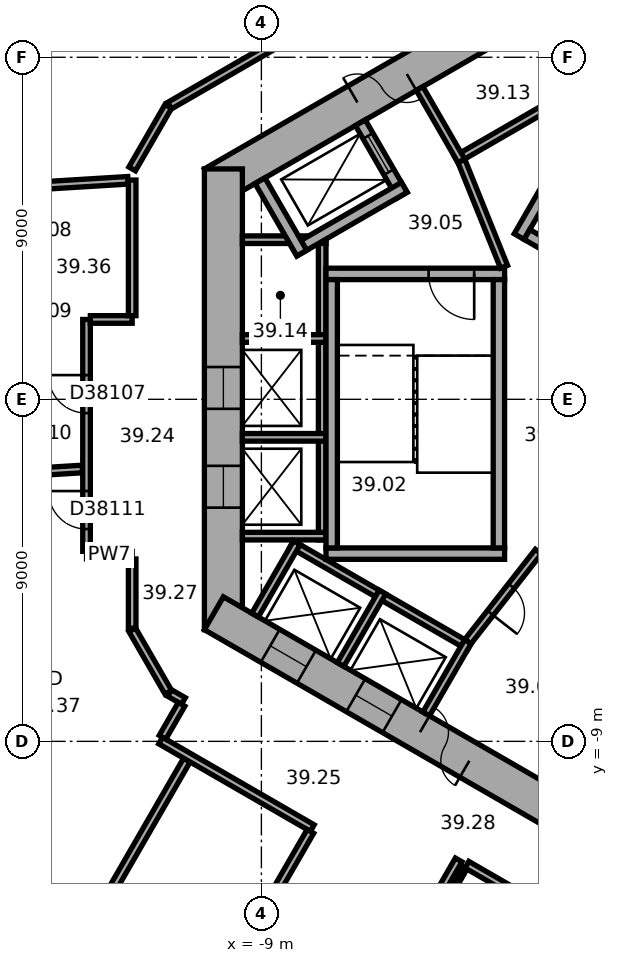
"""IFC4 building model, lengths in metres.
Left out: names, types, materials, properties, quantities, classifications, styles, units other than length and angle.
Written with IfcOpenShell. Run it as: python <this file> out.ifc"""

import sys

from ifc_helpers import new_model, si_unit, direction, frame, frame_2d, origin, place, context, subcontext, project, spatial, rectangle, extrude, element, fill, save


model = new_model("IFC4")
c1 = context("Model", 3, precision=1e-05, world=origin(), true_north=direction((0.0, 1.0)))
c2 = subcontext(c1, "Body", "Model", "MODEL_VIEW")
j1 = project(units=[si_unit("LENGTHUNIT", "METRE"), si_unit("PLANEANGLEUNIT", "RADIAN")], contexts=[c1])
p1 = place(None, origin())
s1 = spatial("IfcSite", under=j1, at=p1, CompositionType="ELEMENT")
p2 = place(p1, origin())
s2 = spatial("IfcBuilding", under=s1, at=p2, CompositionType="ELEMENT")
p3 = place(p2, frame((0.0, 0.0, 161.4)))
s3 = spatial("IfcBuildingStorey", under=s2, at=p3, CompositionType="ELEMENT", Elevation=161.4)
p4 = place(p3, frame((0.25, 11.691, 0.0), z_axis=(0.0, 0.0, 1.0), x_axis=(-0.866022616891, -0.50000482701, 0.0)))
e1 = element("IfcWall", 1, at=p4, inside=s3, PredefinedType="SHEAR", context=c2, shape_type="SweptSolid", body=[
    extrude(rectangle(XDim=12.125, YDim=1.0, at=frame_2d((6.062, 0.0))), origin(), (0.0, 0.0, 1.0), 3.7),
])
p5 = place(p4, frame((6.262, 0.0, 0.0)))
e2 = element("IfcOpeningElement", 2, at=p5, cuts=e1, PredefinedType="OPENING", context=c2, shape_type="SweptSolid", body=[
    extrude(rectangle(XDim=1.5, YDim=2.1, at=frame_2d((0.75, 1.05))), frame((0.0, 0.51, 0.0), z_axis=(0.0, -1.0, 0.0), x_axis=(1.0, 0.0, 0.0)), (0.0, 0.0, 1.0), 1.02),
])
p6 = place(p4, frame((3.112, 0.0, 0.0)))
e3 = element("IfcOpeningElement", 3, at=p6, cuts=e1, PredefinedType="OPENING", context=c2, shape_type="SweptSolid", body=[
    extrude(rectangle(XDim=0.9, YDim=2.1, at=frame_2d((0.45, 1.05))), frame((0.0, 0.51, 0.0), z_axis=(0.0, -1.0, 0.0), x_axis=(1.0, 0.0, 0.0)), (0.0, 0.0, 1.0), 1.02),
])
p7 = place(p3, frame((-10.0, 6.062, 0.0), z_axis=(0.0, 0.0, 1.0), x_axis=(0.0, -1.0, 0.0)))
e4 = element("IfcWall", 4, at=p7, inside=s3, PredefinedType="SHEAR", context=c2, shape_type="SweptSolid", body=[
    extrude(rectangle(XDim=12.125, YDim=1.0, at=frame_2d((6.062, 0.0))), origin(), (0.0, 0.0, 1.0), 3.7),
])
p8 = place(p7, frame((5.212, 0.0, 0.0)))
e5 = element("IfcOpeningElement", 5, at=p8, cuts=e4, PredefinedType="OPENING", context=c2, shape_type="SweptSolid", body=[
    extrude(rectangle(XDim=1.1, YDim=2.1, at=frame_2d((0.55, 1.05))), frame((0.0, 0.51, 0.0), z_axis=(0.0, -1.0, 0.0), x_axis=(1.0, 0.0, 0.0)), (0.0, 0.0, 1.0), 1.02),
])
p9 = place(p7, frame((7.812, 0.0, 0.0)))
e6 = element("IfcOpeningElement", 6, at=p9, cuts=e4, PredefinedType="OPENING", context=c2, shape_type="SweptSolid", body=[
    extrude(rectangle(XDim=1.1, YDim=2.1, at=frame_2d((0.55, 1.05))), frame((0.0, 0.51, 0.0), z_axis=(0.0, -1.0, 0.0), x_axis=(1.0, 0.0, 0.0)), (0.0, 0.0, 1.0), 1.02),
])
p10 = place(p3, frame((-10.25, -5.629, 0.0), z_axis=(0.0, 0.0, 1.0), x_axis=(0.866022616891, -0.50000482701, 0.0)))
e7 = element("IfcWall", 7, at=p10, inside=s3, PredefinedType="SHEAR", context=c2, shape_type="SweptSolid", body=[
    extrude(rectangle(XDim=12.125, YDim=1.0, at=frame_2d((6.062, 0.0))), origin(), (0.0, 0.0, 1.0), 3.7),
])
p11 = place(p10, frame((6.262, 0.0, 0.0)))
e8 = element("IfcOpeningElement", 8, at=p11, cuts=e7, PredefinedType="OPENING", context=c2, shape_type="SweptSolid", body=[
    extrude(rectangle(XDim=1.5, YDim=2.1, at=frame_2d((0.75, 1.05))), frame((0.0, 0.51, 0.0), z_axis=(0.0, -1.0, 0.0), x_axis=(1.0, 0.0, 0.0)), (0.0, 0.0, 1.0), 1.02),
])
p12 = place(p10, frame((1.712, 0.0, 0.0)))
e9 = element("IfcOpeningElement", 9, at=p12, cuts=e7, PredefinedType="OPENING", context=c2, shape_type="SweptSolid", body=[
    extrude(rectangle(XDim=1.1, YDim=2.1, at=frame_2d((0.55, 1.05))), frame((0.0, 0.51, 0.0), z_axis=(0.0, -1.0, 0.0), x_axis=(1.0, 0.0, 0.0)), (0.0, 0.0, 1.0), 1.02),
])
p13 = place(p10, frame((4.312, 0.0, 0.0)))
e10 = element("IfcOpeningElement", 10, at=p13, cuts=e7, PredefinedType="OPENING", context=c2, shape_type="SweptSolid", body=[
    extrude(rectangle(XDim=1.1, YDim=2.1, at=frame_2d((0.55, 1.05))), frame((0.0, 0.51, 0.0), z_axis=(0.0, -1.0, 0.0), x_axis=(1.0, 0.0, 0.0)), (0.0, 0.0, 1.0), 1.02),
])
p14 = place(p3, frame((0.803, 9.009, 0.0), z_axis=(0.0, 0.0, 1.0), x_axis=(-0.866028230842, -0.499995103361, 0.0)))
e11 = element("IfcWall", 11, at=p14, inside=s3, PredefinedType="PARTITIONING", context=c2, shape_type="SweptSolid", body=[
    extrude(rectangle(XDim=5.4, YDim=0.2, at=frame_2d((2.7, 0.0))), origin(), (0.0, 0.0, 1.0), 3.42),
])
p15 = place(p3, frame((-3.737, 6.272, 0.0), z_axis=(0.0, 0.0, 1.0), x_axis=(-0.50002983664, 0.866008176907, 0.0)))
e12 = element("IfcWall", 12, at=p15, inside=s3, PredefinedType="PARTITIONING", context=c2, shape_type="SweptSolid", body=[
    extrude(rectangle(XDim=2.2, YDim=0.2, at=frame_2d((1.1, 0.0))), origin(), (0.0, 0.0, 1.0), 3.42),
])
p16 = place(p3, frame((-7.4, 4.3, 0.0), z_axis=(0.0, 0.0, 1.0), x_axis=(0.0, -1.0, 0.0)))
e13 = element("IfcWall", 13, at=p16, inside=s3, PredefinedType="PARTITIONING", context=c2, shape_type="SweptSolid", body=[
    extrude(rectangle(XDim=8.0, YDim=0.2, at=frame_2d((4.0, 0.0))), origin(), (0.0, 0.0, 1.0), 3.42),
])
for number, where, z_axis, x_axis in (
    (14, (-7.3, 4.2, 0.0), (0.0, 0.0, 1.0), (-1.0, 0.0, 0.0)),
    (15, (-7.3, 1.6, 0.0), (0.0, 0.0, 1.0), (-1.0, 0.0, 0.0)),
    (16, (-7.3, -1.0, 0.0), (0.0, 0.0, 1.0), (-1.0, 0.0, 0.0)),
    (17, (-7.3, -3.6, 0.0), (0.0, 0.0, 1.0), (-1.0, 0.0, 0.0)),
):
    element("IfcWall", number, at=place(p3, frame(where, z_axis=z_axis, x_axis=x_axis)), inside=s3, PredefinedType="PARTITIONING", context=c2, shape_type="SweptSolid", body=[
        extrude(rectangle(XDim=2.2, YDim=0.2, at=frame_2d((1.1, 0.0))), origin(), (0.0, 0.0, 1.0), 3.42),
    ])
p17 = place(p3, frame((-8.203, -3.809, 0.0), z_axis=(0.0, 0.0, 1.0), x_axis=(0.866028230842, -0.499995103361, 0.0)))
e18 = element("IfcWall", 18, at=p17, inside=s3, PredefinedType="PARTITIONING", context=c2, shape_type="SweptSolid", body=[
    extrude(rectangle(XDim=5.4, YDim=0.2, at=frame_2d((2.7, 0.0))), origin(), (0.0, 0.0, 1.0), 3.42),
])
for number, where, z_axis, x_axis in (
    (19, (-8.067, -3.772, 0.0), (0.0, 0.0, 1.0), (-0.5, -0.866, 0.0)),
    (20, (-5.815, -5.072, 0.0), (0.0, 0.0, 1.0), (-0.5, -0.866, 0.0)),
):
    element("IfcWall", number, at=place(p3, frame(where, z_axis=z_axis, x_axis=x_axis)), inside=s3, PredefinedType="PARTITIONING", context=c2, shape_type="SweptSolid", body=[
        extrude(rectangle(XDim=2.2, YDim=0.2, at=frame_2d((1.1, 0.0))), origin(), (0.0, 0.0, 1.0), 3.42),
    ])
p18 = place(p3, frame((-3.563, -6.372, 0.0), z_axis=(0.0, 0.0, 1.0), x_axis=(-0.499994660107, -0.866028486751, 0.0)))
e21 = element("IfcWall", 21, at=p18, inside=s3, PredefinedType="PARTITIONING", context=c2, shape_type="SweptSolid", body=[
    extrude(rectangle(XDim=2.2, YDim=0.2, at=frame_2d((1.1, 0.0))), origin(), (0.0, 0.0, 1.0), 3.42),
])
p19 = place(p3, frame((-2.216, 4.282, 0.0), z_axis=(0.0, 0.0, 1.0), x_axis=(0.499977259774, 0.866038532462, 0.0)))
e22 = element("IfcWall", 22, at=p19, inside=s3, PredefinedType="SHEAR", context=c2, shape_type="SweptSolid", body=[
    extrude(rectangle(XDim=4.7, YDim=0.3, at=frame_2d((2.35, 0.0))), origin(), (0.0, 0.0, 1.0), 3.42),
])
p20 = place(p3, frame((4.103, 0.807, 0.0), z_axis=(0.0, 0.0, 1.0), x_axis=(-0.866027801685, 0.499995846692, 0.0)))
e23 = element("IfcWall", 23, at=p20, inside=s3, PredefinedType="SHEAR", context=c2, shape_type="SweptSolid", body=[
    extrude(rectangle(XDim=7.06, YDim=0.3, at=frame_2d((3.53, 0.0))), origin(), (0.0, 0.0, 1.0), 3.42),
])
p21 = place(p3, frame((-2.6, 3.3, 0.0), z_axis=(0.0, 0.0, 1.0), x_axis=(-1.0, 0.0, 0.0)))
e24 = element("IfcWall", 24, at=p21, inside=s3, PredefinedType="SHEAR", context=c2, shape_type="SweptSolid", body=[
    extrude(rectangle(XDim=4.7, YDim=0.3, at=frame_2d((2.35, 0.0))), origin(), (0.0, 0.0, 1.0), 3.42),
])
p22 = place(p21, frame((0.8, 0.0, 0.0)))
e25 = element("IfcOpeningElement", 25, at=p22, cuts=e24, PredefinedType="OPENING", context=c2, shape_type="SweptSolid", body=[
    extrude(rectangle(XDim=1.2, YDim=2.1, at=frame_2d((0.6, 1.05))), frame((0.0, 0.16, 0.0), z_axis=(0.0, -1.0, 0.0), x_axis=(1.0, 0.0, 0.0)), (0.0, 0.0, 1.0), 0.32),
])
p23 = place(p3, frame((-2.6, -4.06, 0.0), z_axis=(0.0, 0.0, 1.0), x_axis=(-1.0, 0.0, 0.0)))
e26 = element("IfcWall", 26, at=p23, inside=s3, PredefinedType="SHEAR", context=c2, shape_type="SweptSolid", body=[
    extrude(rectangle(XDim=4.7, YDim=0.3, at=frame_2d((2.35, 0.0))), origin(), (0.0, 0.0, 1.0), 3.42),
])
for number, where, z_axis, x_axis in (
    (27, (-2.75, 3.15, 0.0), (0.0, 0.0, 1.0), (0.0, -1.0, 0.0)),
    (28, (-7.15, 3.15, 0.0), (0.0, 0.0, 1.0), (0.0, -1.0, 0.0)),
):
    element("IfcWall", number, at=place(p3, frame(where, z_axis=z_axis, x_axis=x_axis)), inside=s3, PredefinedType="SHEAR", context=c2, shape_type="SweptSolid", body=[
        extrude(rectangle(XDim=7.06, YDim=0.3, at=frame_2d((3.53, 0.0))), origin(), (0.0, 0.0, 1.0), 3.42),
    ])
p24 = place(p3, frame((-5.295, 5.372, 0.0), z_axis=(0.0, 0.0, 1.0), x_axis=(-0.500077893725, 0.86598042715, 0.0)))
e29 = element("IfcWall", 29, at=p24, inside=s3, PredefinedType="SHEAR", context=c2, shape_type="SweptSolid", body=[
    extrude(rectangle(XDim=2.2, YDim=0.3, at=frame_2d((1.1, 0.0))), origin(), (0.0, 0.0, 1.0), 3.42),
])
p25 = place(p24, frame((0.7, 0.0, 0.0)))
e30 = element("IfcOpeningElement", 30, at=p25, cuts=e29, PredefinedType="OPENING", context=c2, shape_type="SweptSolid", body=[
    extrude(rectangle(XDim=1.1, YDim=2.1, at=frame_2d((0.55, 1.05))), frame((0.0, 0.16, 0.0), z_axis=(0.0, -1.0, 0.0), x_axis=(1.0, 0.0, 0.0)), (0.0, 0.0, 1.0), 0.32),
])
p26 = place(p3, frame((-5.24, 5.577, 0.0), z_axis=(0.0, 0.0, 1.0), x_axis=(-0.866014461049, -0.500018952895, 0.0)))
e31 = element("IfcWall", 31, at=p26, inside=s3, PredefinedType="SHEAR", context=c2, shape_type="SweptSolid", body=[
    extrude(rectangle(XDim=3.35, YDim=0.3, at=frame_2d((1.675, 0.0))), origin(), (0.0, 0.0, 1.0), 3.42),
])
p27 = place(p3, frame((-7.937, 3.847, 0.0), z_axis=(0.0, 0.0, 1.0), x_axis=(-0.50002983664, 0.866008176907, 0.0)))
e32 = element("IfcWall", 32, at=p27, inside=s3, PredefinedType="SHEAR", context=c2, shape_type="SweptSolid", body=[
    extrude(rectangle(XDim=2.2, YDim=0.3, at=frame_2d((1.1, 0.0))), origin(), (0.0, 0.0, 1.0), 3.42),
])
p28 = place(p3, frame((-2.615, 3.487, 0.0), z_axis=(0.0, 0.0, 1.0), x_axis=(-0.373576831041, 0.92759924068, 0.0)))
e33 = element("IfcWall", 33, at=p28, inside=s3, PredefinedType="PARTITIONING", context=c2, shape_type="SweptSolid", body=[
    extrude(rectangle(XDim=3.002, YDim=0.2, at=frame_2d((1.501, 0.0))), origin(), (0.0, 0.0, 1.0), 3.42),
])
p29 = place(p3, frame((-1.712, -4.008, 0.0), z_axis=(0.0, 0.0, 1.0), x_axis=(-0.616549420702, -0.787316208287, 0.0)))
e34 = element("IfcWall", 34, at=p29, inside=s3, PredefinedType="PARTITIONING", context=c2, shape_type="SweptSolid", body=[
    extrude(rectangle(XDim=3.002, YDim=0.2, at=frame_2d((1.501, 0.0))), origin(), (0.0, 0.0, 1.0), 3.42),
])
p30 = place(p29, frame((1.15, 0.0, 0.0)))
e35 = element("IfcOpeningElement", 35, at=p30, cuts=e34, PredefinedType="OPENING", context=c2, shape_type="SweptSolid", body=[
    extrude(rectangle(XDim=0.9, YDim=2.1, at=frame_2d((0.45, 1.05))), frame((0.0, 0.11, 0.0), z_axis=(0.0, -1.0, 0.0), x_axis=(1.0, 0.0, 0.0)), (0.0, 0.0, 1.0), 0.22),
])
p31 = place(p3, frame((-21.109, 5.237, 0.0), z_axis=(0.0, 0.0, 1.0), x_axis=(0.998135264293, 0.061040922131, 0.0)))
e36 = element("IfcWall", 36, at=p31, inside=s3, PredefinedType="PARTITIONING", context=c2, shape_type="SweptSolid", body=[
    extrude(rectangle(XDim=8.615, YDim=0.2, at=frame_2d((4.308, 0.0))), origin(), (0.0, 0.0, 1.0), 3.42),
])
p32 = place(p3, frame((-20.651, -2.258, 0.0), z_axis=(0.0, 0.0, 1.0), x_axis=(0.998133960965, 0.061062230286, 0.0)))
e37 = element("IfcWall", 37, at=p32, inside=s3, PredefinedType="PARTITIONING", context=c2, shape_type="SweptSolid", body=[
    extrude(rectangle(XDim=6.953, YDim=0.2, at=frame_2d((3.477, 0.0))), origin(), (0.0, 0.0, 1.0), 3.42),
])
p33 = place(p3, frame((-14.486, -15.597, 0.0), z_axis=(0.0, 0.0, 1.0), x_axis=(0.499983284935, 0.866035054017, 0.0)))
e38 = element("IfcWall", 38, at=p33, inside=s3, PredefinedType="PARTITIONING", context=c2, shape_type="SweptSolid", body=[
    extrude(rectangle(XDim=7.049, YDim=0.2, at=frame_2d((3.524, 0.0))), origin(), (0.0, 0.0, 1.0), 3.42),
])
p34 = place(p3, frame((-13.601, -4.101, 0.0), z_axis=(0.0, 0.0, 1.0), x_axis=(1.0, 0.0, 0.0)))
e39 = element("IfcWall", 39, at=p34, inside=s3, PredefinedType="PARTITIONING", context=c2, shape_type="SweptSolid", body=[
    extrude(rectangle(XDim=1.201, YDim=0.2, at=frame_2d((0.601, 0.0))), origin(), (0.0, 0.0, 1.0), 3.42),
])
p35 = place(p3, frame((-13.601, 2.101, 0.0), z_axis=(0.0, 0.0, 1.0), x_axis=(0.0, -1.0, 0.0)))
e40 = element("IfcWall", 40, at=p35, inside=s3, PredefinedType="PARTITIONING", context=c2, shape_type="SweptSolid", body=[
    extrude(rectangle(XDim=6.102, YDim=0.2, at=frame_2d((3.051, 0.0))), origin(), (0.0, 0.0, 1.0), 3.42),
])
p36 = place(p35, frame((1.464, 0.0, 0.0)))
e41 = element("IfcOpeningElement", 41, at=p36, cuts=e40, PredefinedType="OPENING", context=c2, shape_type="SweptSolid", body=[
    extrude(rectangle(XDim=1.0, YDim=2.1, at=frame_2d((0.5, 1.05))), frame((0.0, 0.11, 0.0), z_axis=(0.0, -1.0, 0.0), x_axis=(1.0, 0.0, 0.0)), (0.0, 0.0, 1.0), 0.22),
])
p37 = place(p35, frame((4.515, 0.0, 0.0)))
e42 = element("IfcOpeningElement", 42, at=p37, cuts=e40, PredefinedType="OPENING", context=c2, shape_type="SweptSolid", body=[
    extrude(rectangle(XDim=1.0, YDim=2.1, at=frame_2d((0.5, 1.05))), frame((0.0, 0.11, 0.0), z_axis=(0.0, -1.0, 0.0), x_axis=(1.0, 0.0, 0.0)), (0.0, 0.0, 1.0), 0.22),
])
p38 = place(p3, frame((-12.4, -6.062, 0.0), z_axis=(0.0, 0.0, 1.0), x_axis=(0.500022797313, -0.86601224135, 0.0)))
e43 = element("IfcWall", 43, at=p38, inside=s3, PredefinedType="PARTITIONING", context=c2, shape_type="SweptSolid", body=[
    extrude(rectangle(XDim=1.9, YDim=0.2, at=frame_2d((0.95, 0.0))), origin(), (0.0, 0.0, 1.0), 3.42),
])
p39 = place(p3, frame((-12.4, -4.201, 0.0), z_axis=(0.0, 0.0, 1.0), x_axis=(0.0, -1.0, 0.0)))
e44 = element("IfcWall", 44, at=p39, inside=s3, PredefinedType="PARTITIONING", context=c2, shape_type="SweptSolid", body=[
    extrude(rectangle(XDim=1.821, YDim=0.2, at=frame_2d((0.911, 0.0))), origin(), (0.0, 0.0, 1.0), 3.42),
])
p40 = place(p3, frame((-12.4, 2.101, 0.0), z_axis=(0.0, 0.0, 1.0), x_axis=(-1.0, 0.0, 0.0)))
e45 = element("IfcWall", 45, at=p40, inside=s3, PredefinedType="PARTITIONING", context=c2, shape_type="SweptSolid", body=[
    extrude(rectangle(XDim=1.101, YDim=0.2, at=frame_2d((0.551, 0.0))), origin(), (0.0, 0.0, 1.0), 3.42),
])
p41 = place(p3, frame((-12.4, 5.769, 0.0), z_axis=(0.0, 0.0, 1.0), x_axis=(0.0, -1.0, 0.0)))
e46 = element("IfcWall", 46, at=p41, inside=s3, PredefinedType="PARTITIONING", context=c2, shape_type="SweptSolid", body=[
    extrude(rectangle(XDim=3.568, YDim=0.2, at=frame_2d((1.784, 0.0))), origin(), (0.0, 0.0, 1.0), 3.42),
])
p42 = place(p3, frame((-11.651, -8.978, 0.0), z_axis=(0.0, 0.0, 1.0), x_axis=(0.866010893236, -0.500025132165, 0.0)))
e47 = element("IfcWall", 47, at=p42, inside=s3, PredefinedType="PARTITIONING", context=c2, shape_type="SweptSolid", body=[
    extrude(rectangle(XDim=4.608, YDim=0.2, at=frame_2d((2.304, 0.0))), origin(), (0.0, 0.0, 1.0), 3.42),
])
p43 = place(p3, frame((-11.45, 7.708, 0.0), z_axis=(0.0, 0.0, 1.0), x_axis=(-0.500022797313, -0.86601224135, 0.0)))
e48 = element("IfcWall", 48, at=p43, inside=s3, PredefinedType="PARTITIONING", context=c2, shape_type="SweptSolid", body=[
    extrude(rectangle(XDim=1.9, YDim=0.2, at=frame_2d((0.95, 0.0))), origin(), (0.0, 0.0, 1.0), 3.42),
])
p44 = place(p3, frame((-11.415, -7.728, 0.0), z_axis=(0.0, 0.0, 1.0), x_axis=(0.865915281873, -0.500190688257, 0.0)))
e49 = element("IfcWall", 49, at=p44, inside=s3, PredefinedType="PARTITIONING", context=c2, shape_type="SweptSolid", body=[
    extrude(rectangle(XDim=0.421, YDim=0.2, at=frame_2d((0.21, 0.0))), origin(), (0.0, 0.0, 1.0), 3.42),
])
p45 = place(p3, frame((-11.235, -17.474, 0.0), z_axis=(0.0, 0.0, 1.0), x_axis=(0.500009260695, 0.866020057054, 0.0)))
e50 = element("IfcWall", 50, at=p45, inside=s3, PredefinedType="PARTITIONING", context=c2, shape_type="SweptSolid", body=[
    extrude(rectangle(XDim=7.049, YDim=0.2, at=frame_2d((3.524, 0.0))), origin(), (0.0, 0.0, 1.0), 2.87),
])
p46 = place(p45, frame((3.024, 0.0, 0.0)))
e51 = element("IfcOpeningElement", 51, at=p46, cuts=e50, PredefinedType="OPENING", context=c2, shape_type="SweptSolid", body=[
    extrude(rectangle(XDim=1.0, YDim=2.1, at=frame_2d((0.5, 1.05))), frame((0.0, 0.11, 0.0), z_axis=(0.0, -1.0, 0.0), x_axis=(1.0, 0.0, 0.0)), (0.0, 0.0, 1.0), 0.22),
])
p47 = place(p3, frame((-11.101, -8.025, 0.0), z_axis=(0.0, 0.0, 1.0), x_axis=(-0.500074377092, -0.865982457891, 0.0)))
e52 = element("IfcWall", 52, at=p47, inside=s3, PredefinedType="PARTITIONING", context=c2, shape_type="SweptSolid", body=[
    extrude(rectangle(XDim=1.001, YDim=0.2, at=frame_2d((0.5, 0.0))), origin(), (0.0, 0.0, 1.0), 3.42),
])
p48 = place(p3, frame((-8.678, 9.308, 0.0), z_axis=(0.0, 0.0, 1.0), x_axis=(-0.866000359435, -0.500043375578, 0.0)))
e53 = element("IfcWall", 53, at=p48, inside=s3, PredefinedType="PARTITIONING", context=c2, shape_type="SweptSolid", body=[
    extrude(rectangle(XDim=3.161, YDim=0.2, at=frame_2d((1.581, 0.0))), origin(), (0.0, 0.0, 1.0), 3.42),
])
p49 = place(p3, frame((-7.984, -19.351, 0.0), z_axis=(0.0, 0.0, 1.0), x_axis=(0.500010139422, 0.866019549707, 0.0)))
e54 = element("IfcWall", 54, at=p49, inside=s3, PredefinedType="PARTITIONING", context=c2, shape_type="SweptSolid", body=[
    extrude(rectangle(XDim=8.35, YDim=0.2, at=frame_2d((4.175, 0.0))), origin(), (0.0, 0.0, 1.0), 3.42),
])
p50 = place(p49, frame((3.675, 0.0, 0.0)))
e55 = element("IfcOpeningElement", 55, at=p50, cuts=e54, PredefinedType="OPENING", context=c2, shape_type="SweptSolid", body=[
    extrude(rectangle(XDim=1.0, YDim=2.1, at=frame_2d((0.5, 1.05))), frame((0.0, 0.11, 0.0), z_axis=(0.0, -1.0, 0.0), x_axis=(1.0, 0.0, 0.0)), (0.0, 0.0, 1.0), 0.22),
])
p51 = place(p3, frame((-5.192, -15.016, 0.0), z_axis=(0.0, 0.0, 1.0), x_axis=(0.500026960575, 0.86600983753, 0.0)))
e56 = element("IfcWall", 56, at=p51, inside=s3, PredefinedType="PARTITIONING", context=c2, shape_type="SweptSolid", body=[
    extrude(rectangle(XDim=3.1, YDim=0.12, at=frame_2d((1.55, 0.0))), origin(), (0.0, 0.0, 1.0), 3.42),
])
p52 = place(p3, frame((-3.592, -12.244, 0.0), z_axis=(0.0, 0.0, 1.0), x_axis=(0.866034573852, -0.49998411664, 0.0)))
e57 = element("IfcWall", 57, at=p52, inside=s3, PredefinedType="PARTITIONING", context=c2, shape_type="SweptSolid", body=[
    extrude(rectangle(XDim=2.8, YDim=0.2, at=frame_2d((1.4, 0.0))), origin(), (0.0, 0.0, 1.0), 3.42),
])
p53 = place(p5, origin())
e58 = element("IfcDoor", 58, at=p53, inside=s3, OperationType="DOUBLE_DOOR_SINGLE_SWING", PredefinedType="DOOR", context=c2, shape_type="SweptSolid", body=[
    extrude(rectangle(XDim=1.5, YDim=2.1, at=frame_2d((0.75, 1.05))), frame((0.0, 0.025, 0.0), z_axis=(0.0, -1.0, 0.0), x_axis=(1.0, 0.0, 0.0)), (0.0, 0.0, 1.0), 0.05),
])
fill(e2, e58)
p54 = place(p11, origin())
e59 = element("IfcDoor", 59, at=p54, inside=s3, OperationType="DOUBLE_DOOR_SINGLE_SWING", PredefinedType="DOOR", context=c2, shape_type="SweptSolid", body=[
    extrude(rectangle(XDim=1.5, YDim=2.1, at=frame_2d((0.75, 1.05))), frame((0.0, 0.025, 0.0), z_axis=(0.0, -1.0, 0.0), x_axis=(1.0, 0.0, 0.0)), (0.0, 0.0, 1.0), 0.05),
])
fill(e8, e59)
p55 = place(p22, origin())
e60 = element("IfcDoor", 60, at=p55, inside=s3, OperationType="SINGLE_SWING_RIGHT", PredefinedType="DOOR", context=c2, shape_type="SweptSolid", body=[
    extrude(rectangle(XDim=1.2, YDim=2.1, at=frame_2d((0.6, 1.05))), frame((0.0, 0.025, 0.0), z_axis=(0.0, -1.0, 0.0), x_axis=(1.0, 0.0, 0.0)), (0.0, 0.0, 1.0), 0.05),
])
fill(e25, e60)
p56 = place(p30, origin())
e61 = element("IfcDoor", 61, at=p56, inside=s3, OperationType="SINGLE_SWING_LEFT", PredefinedType="DOOR", context=c2, shape_type="SweptSolid", body=[
    extrude(rectangle(XDim=0.9, YDim=2.1, at=frame_2d((0.45, 1.05))), frame((0.0, 0.025, 0.0), z_axis=(0.0, -1.0, 0.0), x_axis=(1.0, 0.0, 0.0)), (0.0, 0.0, 1.0), 0.05),
])
fill(e35, e61)
p57 = place(p25, origin())
e62 = element("IfcDoor", 62, at=p57, inside=s3, OperationType="DOUBLE_DOOR_SLIDING", PredefinedType="DOOR", context=c2, shape_type="SweptSolid", body=[
    extrude(rectangle(XDim=1.1, YDim=2.1, at=frame_2d((0.55, 1.05))), frame((0.0, 0.025, 0.0), z_axis=(0.0, -1.0, 0.0), x_axis=(1.0, 0.0, 0.0)), (0.0, 0.0, 1.0), 0.05),
])
fill(e30, e62)
p58 = place(p8, origin())
e63 = element("IfcDoor", 63, at=p58, inside=s3, OperationType="DOUBLE_DOOR_SLIDING", PredefinedType="DOOR", context=c2, shape_type="SweptSolid", body=[
    extrude(rectangle(XDim=1.1, YDim=2.1, at=frame_2d((0.55, 1.05))), frame((0.0, 0.025, 0.0), z_axis=(0.0, -1.0, 0.0), x_axis=(1.0, 0.0, 0.0)), (0.0, 0.0, 1.0), 0.05),
])
fill(e5, e63)
p59 = place(p9, origin())
e64 = element("IfcDoor", 64, at=p59, inside=s3, OperationType="DOUBLE_DOOR_SLIDING", PredefinedType="DOOR", context=c2, shape_type="SweptSolid", body=[
    extrude(rectangle(XDim=1.1, YDim=2.1, at=frame_2d((0.55, 1.05))), frame((0.0, 0.025, 0.0), z_axis=(0.0, -1.0, 0.0), x_axis=(1.0, 0.0, 0.0)), (0.0, 0.0, 1.0), 0.05),
])
fill(e6, e64)
p60 = place(p12, origin())
e65 = element("IfcDoor", 65, at=p60, inside=s3, OperationType="DOUBLE_DOOR_SLIDING", PredefinedType="DOOR", context=c2, shape_type="SweptSolid", body=[
    extrude(rectangle(XDim=1.1, YDim=2.1, at=frame_2d((0.55, 1.05))), frame((0.0, 0.025, 0.0), z_axis=(0.0, -1.0, 0.0), x_axis=(1.0, 0.0, 0.0)), (0.0, 0.0, 1.0), 0.05),
])
fill(e9, e65)
p61 = place(p13, origin())
e66 = element("IfcDoor", 66, at=p61, inside=s3, OperationType="DOUBLE_DOOR_SLIDING", PredefinedType="DOOR", context=c2, shape_type="SweptSolid", body=[
    extrude(rectangle(XDim=1.1, YDim=2.1, at=frame_2d((0.55, 1.05))), frame((0.0, 0.025, 0.0), z_axis=(0.0, -1.0, 0.0), x_axis=(1.0, 0.0, 0.0)), (0.0, 0.0, 1.0), 0.05),
])
fill(e10, e66)
p62 = place(p36, origin())
e67 = element("IfcDoor", 67, at=p62, inside=s3, OperationType="SINGLE_SWING_LEFT", PredefinedType="DOOR", context=c2, shape_type="SweptSolid", body=[
    extrude(rectangle(XDim=1.0, YDim=2.1, at=frame_2d((0.5, 1.05))), frame((0.0, 0.025, 0.0), z_axis=(0.0, -1.0, 0.0), x_axis=(1.0, 0.0, 0.0)), (0.0, 0.0, 1.0), 0.05),
])
fill(e41, e67)
p63 = place(p37, origin())
e68 = element("IfcDoor", 68, at=p63, inside=s3, OperationType="SINGLE_SWING_LEFT", PredefinedType="DOOR", context=c2, shape_type="SweptSolid", body=[
    extrude(rectangle(XDim=1.0, YDim=2.1, at=frame_2d((0.5, 1.05))), frame((0.0, 0.025, 0.0), z_axis=(0.0, -1.0, 0.0), x_axis=(1.0, 0.0, 0.0)), (0.0, 0.0, 1.0), 0.05),
])
fill(e42, e68)
save(model, sys.argv[1])
